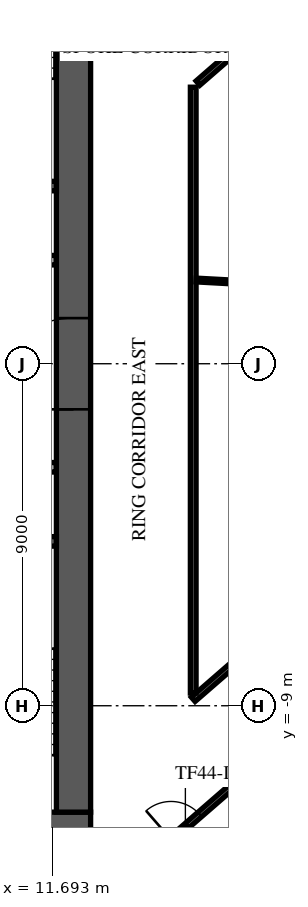
"""IFC4 building model, lengths in metres.
Left out: names, types, materials, properties, quantities, classifications, styles, units other than length and angle.
Written with IfcOpenShell. Run it as: python <this file> out.ifc"""

import sys

from ifc_helpers import new_model, si_unit, direction, frame, frame_2d, origin, place, context, subcontext, project, spatial, rectangle, extrude, element, fill, save


model = new_model("IFC4")
c1 = context("Model", 3, precision=1e-05, world=origin(), true_north=direction((0.0, 1.0)))
c2 = subcontext(c1, "Body", "Model", "MODEL_VIEW")
j1 = project(units=[si_unit("LENGTHUNIT", "METRE"), si_unit("PLANEANGLEUNIT", "RADIAN")], contexts=[c1])
p1 = place(None, origin())
s1 = spatial("IfcSite", under=j1, at=p1, CompositionType="ELEMENT")
p2 = place(p1, origin())
s2 = spatial("IfcBuilding", under=s1, at=p2, CompositionType="ELEMENT")
p3 = place(p2, frame((0.0, 0.0, 189.3)))
s3 = spatial("IfcBuildingStorey", under=s2, at=p3, CompositionType="ELEMENT", Elevation=189.3)
p4 = place(p3, frame((-12.7, -12.25, 0.0), z_axis=(0.0, 0.0, 1.0), x_axis=(1.0, 0.0, 0.0)))
e1 = element("IfcWall", 1, at=p4, inside=s3, PredefinedType="SHEAR", context=c2, shape_type="SweptSolid", body=[
    extrude(rectangle(XDim=25.4, YDim=0.9, at=frame_2d((12.7, 0.0))), origin(), (0.0, 0.0, 1.0), 3.62),
])
p5 = place(p4, frame((7.6, 0.0, 0.0)))
e2 = element("IfcOpeningElement", 2, at=p5, cuts=e1, PredefinedType="OPENING", context=c2, shape_type="SweptSolid", body=[
    extrude(rectangle(XDim=2.0, YDim=2.1, at=frame_2d((1.0, 1.05))), frame((0.0, 0.46, 0.0), z_axis=(0.0, -1.0, 0.0), x_axis=(1.0, 0.0, 0.0)), (0.0, 0.0, 1.0), 0.92),
])
p6 = place(p4, frame((17.725, 0.0, 0.0)))
e3 = element("IfcOpeningElement", 3, at=p6, cuts=e1, PredefinedType="OPENING", context=c2, shape_type="SweptSolid", body=[
    extrude(rectangle(XDim=1.2, YDim=2.1, at=frame_2d((0.6, 1.05))), frame((0.0, 0.46, 0.0), z_axis=(0.0, -1.0, 0.0), x_axis=(1.0, 0.0, 0.0)), (0.0, 0.0, 1.0), 0.92),
])
p7 = place(p4, frame((1.875, 0.0, 0.0)))
e4 = element("IfcOpeningElement", 4, at=p7, cuts=e1, PredefinedType="OPENING", context=c2, shape_type="SweptSolid", body=[
    extrude(rectangle(XDim=1.2, YDim=2.1, at=frame_2d((0.6, 1.05))), frame((0.0, 0.46, 0.0), z_axis=(0.0, -1.0, 0.0), x_axis=(1.0, 0.0, 0.0)), (0.0, 0.0, 1.0), 0.92),
])
p8 = place(p4, frame((22.325, 0.0, 0.0)))
e5 = element("IfcOpeningElement", 5, at=p8, cuts=e1, PredefinedType="OPENING", context=c2, shape_type="SweptSolid", body=[
    extrude(rectangle(XDim=1.2, YDim=2.1, at=frame_2d((0.6, 1.05))), frame((0.0, 0.46, 0.0), z_axis=(0.0, -1.0, 0.0), x_axis=(1.0, 0.0, 0.0)), (0.0, 0.0, 1.0), 0.92),
])
p9 = place(p3, frame((12.25, -11.8, 0.0), z_axis=(0.0, 0.0, 1.0), x_axis=(0.0, 1.0, 0.0)))
e6 = element("IfcWall", 6, at=p9, inside=s3, PredefinedType="SHEAR", context=c2, shape_type="SweptSolid", body=[
    extrude(rectangle(XDim=23.6, YDim=0.9, at=frame_2d((11.8, 0.0))), origin(), (0.0, 0.0, 1.0), 3.62),
])
p10 = place(p9, frame((10.6, 0.0, 0.0)))
e7 = element("IfcOpeningElement", 7, at=p10, cuts=e6, PredefinedType="OPENING", context=c2, shape_type="SweptSolid", body=[
    extrude(rectangle(XDim=2.4, YDim=2.4, at=frame_2d((1.2, 1.2))), frame((0.0, 0.46, 0.0), z_axis=(0.0, -1.0, 0.0), x_axis=(1.0, 0.0, 0.0)), (0.0, 0.0, 1.0), 0.92),
])
for number, where, z_axis, x_axis in (
    (8, (8.65, 4.675, 0.0), (0.0, 0.0, 1.0), (1.0, 0.0, 0.0)),
    (9, (8.65, -4.675, 0.0), (0.0, 0.0, 1.0), (1.0, 0.0, 0.0)),
):
    element("IfcWall", number, at=place(p3, frame(where, z_axis=z_axis, x_axis=x_axis)), inside=s3, PredefinedType="SOLIDWALL", context=c2, shape_type="SweptSolid", body=[
        extrude(rectangle(XDim=3.15, YDim=0.25, at=frame_2d((1.575, 0.0))), origin(), (0.0, 0.0, 1.0), 3.62),
    ])
p11 = place(p3, frame((5.63, -2.725, 0.0), z_axis=(0.0, 0.0, 1.0), x_axis=(1.0, 0.0, 0.0)))
e10 = element("IfcWall", 10, at=p11, inside=s3, PredefinedType="PARTITIONING", context=c2, shape_type="SweptSolid", body=[
    extrude(rectangle(XDim=6.165, YDim=0.25, at=frame_2d((3.083, 0.0))), origin(), (0.0, 0.0, 1.0), 3.62),
])
p12 = place(p11, frame((0.745, 0.0, 0.0)))
e11 = element("IfcOpeningElement", 11, at=p12, cuts=e10, PredefinedType="OPENING", context=c2, shape_type="SweptSolid", body=[
    extrude(rectangle(XDim=1.0, YDim=2.1, at=frame_2d((0.5, 1.05))), frame((0.0, 0.135, 0.0), z_axis=(0.0, -1.0, 0.0), x_axis=(1.0, 0.0, 0.0)), (0.0, 0.0, 1.0), 0.27),
])
p13 = place(p11, frame((3.92, 0.0, 0.0)))
e12 = element("IfcOpeningElement", 12, at=p13, cuts=e10, PredefinedType="OPENING", context=c2, shape_type="SweptSolid", body=[
    extrude(rectangle(XDim=0.9, YDim=2.1, at=frame_2d((0.45, 1.05))), frame((0.0, 0.135, 0.0), z_axis=(0.0, -1.0, 0.0), x_axis=(1.0, 0.0, 0.0)), (0.0, 0.0, 1.0), 0.27),
])
p14 = place(p3, frame((8.38, 2.725, 0.0), z_axis=(0.0, 0.0, 1.0), x_axis=(1.0, 0.0, 0.0)))
e13 = element("IfcWall", 13, at=p14, inside=s3, PredefinedType="PARTITIONING", context=c2, shape_type="SweptSolid", body=[
    extrude(rectangle(XDim=3.415, YDim=0.25, at=frame_2d((1.708, 0.0))), origin(), (0.0, 0.0, 1.0), 3.62),
])
p15 = place(p14, frame((1.17, 0.0, 0.0)))
e14 = element("IfcOpeningElement", 14, at=p15, cuts=e13, PredefinedType="OPENING", context=c2, shape_type="SweptSolid", body=[
    extrude(rectangle(XDim=0.9, YDim=2.1, at=frame_2d((0.45, 1.05))), frame((0.0, 0.135, 0.0), z_axis=(0.0, -1.0, 0.0), x_axis=(1.0, 0.0, 0.0)), (0.0, 0.0, 1.0), 0.27),
])
p16 = place(p3, frame((-2.286, -34.715, 0.0), z_axis=(0.0, 0.0, 1.0), x_axis=(0.754708272811, 0.656060532993, 0.0)))
e15 = element("IfcWall", 15, at=p16, inside=s3, PredefinedType="STANDARD", context=c2, shape_type="SweptSolid", body=[
    extrude(rectangle(XDim=49.0, YDim=0.6, at=frame_2d((24.5, 0.0))), origin(), (0.0, 0.0, 1.0), 3.62),
])
p17 = place(p16, frame((1.227, 0.0, 0.9)))
e16 = element("IfcOpeningElement", 16, at=p17, cuts=e15, PredefinedType="OPENING", context=c2, shape_type="SweptSolid", body=[
    extrude(rectangle(XDim=2.0, YDim=2.1, at=frame_2d((1.0, 1.05))), frame((0.0, 0.31, 0.0), z_axis=(0.0, -1.0, 0.0), x_axis=(1.0, 0.0, 0.0)), (0.0, 0.0, 1.0), 0.62),
])
p18 = place(p16, frame((5.682, 0.0, 0.9)))
e17 = element("IfcOpeningElement", 17, at=p18, cuts=e15, PredefinedType="OPENING", context=c2, shape_type="SweptSolid", body=[
    extrude(rectangle(XDim=2.0, YDim=2.1, at=frame_2d((1.0, 1.05))), frame((0.0, 0.31, 0.0), z_axis=(0.0, -1.0, 0.0), x_axis=(1.0, 0.0, 0.0)), (0.0, 0.0, 1.0), 0.62),
])
p19 = place(p16, frame((10.136, 0.0, 0.9)))
e18 = element("IfcOpeningElement", 18, at=p19, cuts=e15, PredefinedType="OPENING", context=c2, shape_type="SweptSolid", body=[
    extrude(rectangle(XDim=2.0, YDim=2.1, at=frame_2d((1.0, 1.05))), frame((0.0, 0.31, 0.0), z_axis=(0.0, -1.0, 0.0), x_axis=(1.0, 0.0, 0.0)), (0.0, 0.0, 1.0), 0.62),
])
p20 = place(p16, frame((14.591, 0.0, 0.9)))
e19 = element("IfcOpeningElement", 19, at=p20, cuts=e15, PredefinedType="OPENING", context=c2, shape_type="SweptSolid", body=[
    extrude(rectangle(XDim=2.0, YDim=2.1, at=frame_2d((1.0, 1.05))), frame((0.0, 0.31, 0.0), z_axis=(0.0, -1.0, 0.0), x_axis=(1.0, 0.0, 0.0)), (0.0, 0.0, 1.0), 0.62),
])
p21 = place(p16, frame((19.045, 0.0, 0.9)))
e20 = element("IfcOpeningElement", 20, at=p21, cuts=e15, PredefinedType="OPENING", context=c2, shape_type="SweptSolid", body=[
    extrude(rectangle(XDim=2.0, YDim=2.1, at=frame_2d((1.0, 1.05))), frame((0.0, 0.31, 0.0), z_axis=(0.0, -1.0, 0.0), x_axis=(1.0, 0.0, 0.0)), (0.0, 0.0, 1.0), 0.62),
])
p22 = place(p16, frame((23.5, 0.0, 0.9)))
e21 = element("IfcOpeningElement", 21, at=p22, cuts=e15, PredefinedType="OPENING", context=c2, shape_type="SweptSolid", body=[
    extrude(rectangle(XDim=2.0, YDim=2.1, at=frame_2d((1.0, 1.05))), frame((0.0, 0.31, 0.0), z_axis=(0.0, -1.0, 0.0), x_axis=(1.0, 0.0, 0.0)), (0.0, 0.0, 1.0), 0.62),
])
p23 = place(p16, frame((27.955, 0.0, 0.9)))
e22 = element("IfcOpeningElement", 22, at=p23, cuts=e15, PredefinedType="OPENING", context=c2, shape_type="SweptSolid", body=[
    extrude(rectangle(XDim=2.0, YDim=2.1, at=frame_2d((1.0, 1.05))), frame((0.0, 0.31, 0.0), z_axis=(0.0, -1.0, 0.0), x_axis=(1.0, 0.0, 0.0)), (0.0, 0.0, 1.0), 0.62),
])
p24 = place(p16, frame((32.409, 0.0, 0.9)))
e23 = element("IfcOpeningElement", 23, at=p24, cuts=e15, PredefinedType="OPENING", context=c2, shape_type="SweptSolid", body=[
    extrude(rectangle(XDim=2.0, YDim=2.1, at=frame_2d((1.0, 1.05))), frame((0.0, 0.31, 0.0), z_axis=(0.0, -1.0, 0.0), x_axis=(1.0, 0.0, 0.0)), (0.0, 0.0, 1.0), 0.62),
])
p25 = place(p16, frame((36.864, 0.0, 0.9)))
e24 = element("IfcOpeningElement", 24, at=p25, cuts=e15, PredefinedType="OPENING", context=c2, shape_type="SweptSolid", body=[
    extrude(rectangle(XDim=2.0, YDim=2.1, at=frame_2d((1.0, 1.05))), frame((0.0, 0.31, 0.0), z_axis=(0.0, -1.0, 0.0), x_axis=(1.0, 0.0, 0.0)), (0.0, 0.0, 1.0), 0.62),
])
p26 = place(p16, frame((41.318, 0.0, 0.9)))
e25 = element("IfcOpeningElement", 25, at=p26, cuts=e15, PredefinedType="OPENING", context=c2, shape_type="SweptSolid", body=[
    extrude(rectangle(XDim=2.0, YDim=2.1, at=frame_2d((1.0, 1.05))), frame((0.0, 0.31, 0.0), z_axis=(0.0, -1.0, 0.0), x_axis=(1.0, 0.0, 0.0)), (0.0, 0.0, 1.0), 0.62),
])
p27 = place(p16, frame((45.773, 0.0, 0.9)))
e26 = element("IfcOpeningElement", 26, at=p27, cuts=e15, PredefinedType="OPENING", context=c2, shape_type="SweptSolid", body=[
    extrude(rectangle(XDim=2.0, YDim=2.1, at=frame_2d((1.0, 1.05))), frame((0.0, 0.31, 0.0), z_axis=(0.0, -1.0, 0.0), x_axis=(1.0, 0.0, 0.0)), (0.0, 0.0, 1.0), 0.62),
])
p28 = place(p3, frame((35.208, 4.768, 0.0), z_axis=(0.0, 0.0, 1.0), x_axis=(-0.656058749455, 0.754709823219, 0.0)))
e27 = element("IfcWall", 27, at=p28, inside=s3, PredefinedType="STANDARD", context=c2, shape_type="SweptSolid", body=[
    extrude(rectangle(XDim=39.0, YDim=0.6, at=frame_2d((19.5, 0.0))), origin(), (0.0, 0.0, 1.0), 3.62),
])
p29 = place(p28, frame((1.217, 0.0, 0.9)))
e28 = element("IfcOpeningElement", 28, at=p29, cuts=e27, PredefinedType="OPENING", context=c2, shape_type="SweptSolid", body=[
    extrude(rectangle(XDim=1.9, YDim=2.1, at=frame_2d((0.95, 1.05))), frame((0.0, 0.31, 0.0), z_axis=(0.0, -1.0, 0.0), x_axis=(1.0, 0.0, 0.0)), (0.0, 0.0, 1.0), 0.62),
])
p30 = place(p28, frame((5.55, 0.0, 0.9)))
e29 = element("IfcOpeningElement", 29, at=p30, cuts=e27, PredefinedType="OPENING", context=c2, shape_type="SweptSolid", body=[
    extrude(rectangle(XDim=1.9, YDim=2.1, at=frame_2d((0.95, 1.05))), frame((0.0, 0.31, 0.0), z_axis=(0.0, -1.0, 0.0), x_axis=(1.0, 0.0, 0.0)), (0.0, 0.0, 1.0), 0.62),
])
p31 = place(p28, frame((9.883, 0.0, 0.9)))
e30 = element("IfcOpeningElement", 30, at=p31, cuts=e27, PredefinedType="OPENING", context=c2, shape_type="SweptSolid", body=[
    extrude(rectangle(XDim=1.9, YDim=2.1, at=frame_2d((0.95, 1.05))), frame((0.0, 0.31, 0.0), z_axis=(0.0, -1.0, 0.0), x_axis=(1.0, 0.0, 0.0)), (0.0, 0.0, 1.0), 0.62),
])
p32 = place(p28, frame((14.217, 0.0, 0.9)))
e31 = element("IfcOpeningElement", 31, at=p32, cuts=e27, PredefinedType="OPENING", context=c2, shape_type="SweptSolid", body=[
    extrude(rectangle(XDim=1.9, YDim=2.1, at=frame_2d((0.95, 1.05))), frame((0.0, 0.31, 0.0), z_axis=(0.0, -1.0, 0.0), x_axis=(1.0, 0.0, 0.0)), (0.0, 0.0, 1.0), 0.62),
])
p33 = place(p28, frame((18.55, 0.0, 0.9)))
e32 = element("IfcOpeningElement", 32, at=p33, cuts=e27, PredefinedType="OPENING", context=c2, shape_type="SweptSolid", body=[
    extrude(rectangle(XDim=1.9, YDim=2.1, at=frame_2d((0.95, 1.05))), frame((0.0, 0.31, 0.0), z_axis=(0.0, -1.0, 0.0), x_axis=(1.0, 0.0, 0.0)), (0.0, 0.0, 1.0), 0.62),
])
p34 = place(p28, frame((22.883, 0.0, 0.9)))
e33 = element("IfcOpeningElement", 33, at=p34, cuts=e27, PredefinedType="OPENING", context=c2, shape_type="SweptSolid", body=[
    extrude(rectangle(XDim=1.9, YDim=2.1, at=frame_2d((0.95, 1.05))), frame((0.0, 0.31, 0.0), z_axis=(0.0, -1.0, 0.0), x_axis=(1.0, 0.0, 0.0)), (0.0, 0.0, 1.0), 0.62),
])
p35 = place(p28, frame((27.217, 0.0, 0.9)))
e34 = element("IfcOpeningElement", 34, at=p35, cuts=e27, PredefinedType="OPENING", context=c2, shape_type="SweptSolid", body=[
    extrude(rectangle(XDim=1.9, YDim=2.1, at=frame_2d((0.95, 1.05))), frame((0.0, 0.31, 0.0), z_axis=(0.0, -1.0, 0.0), x_axis=(1.0, 0.0, 0.0)), (0.0, 0.0, 1.0), 0.62),
])
p36 = place(p28, frame((31.55, 0.0, 0.9)))
e35 = element("IfcOpeningElement", 35, at=p36, cuts=e27, PredefinedType="OPENING", context=c2, shape_type="SweptSolid", body=[
    extrude(rectangle(XDim=1.9, YDim=2.1, at=frame_2d((0.95, 1.05))), frame((0.0, 0.31, 0.0), z_axis=(0.0, -1.0, 0.0), x_axis=(1.0, 0.0, 0.0)), (0.0, 0.0, 1.0), 0.62),
])
p37 = place(p28, frame((35.883, 0.0, 0.9)))
e36 = element("IfcOpeningElement", 36, at=p37, cuts=e27, PredefinedType="OPENING", context=c2, shape_type="SweptSolid", body=[
    extrude(rectangle(XDim=1.9, YDim=2.1, at=frame_2d((0.95, 1.05))), frame((0.0, 0.31, 0.0), z_axis=(0.0, -1.0, 0.0), x_axis=(1.0, 0.0, 0.0)), (0.0, 0.0, 1.0), 0.62),
])
p38 = place(p3, frame((-1.0, -26.268, 0.0), z_axis=(0.0, 0.0, 1.0), x_axis=(0.754711356604, 0.656056985492, 0.0)))
e37 = element("IfcWall", 37, at=p38, inside=s3, PredefinedType="PARTITIONING", context=c2, shape_type="SweptSolid", body=[
    extrude(rectangle(XDim=36.052, YDim=0.15, at=frame_2d((18.026, 0.0))), origin(), (0.0, 0.0, 1.0), 3.17),
])
p39 = place(p38, frame((9.598, 0.0, 0.0)))
e38 = element("IfcOpeningElement", 38, at=p39, cuts=e37, PredefinedType="OPENING", context=c2, shape_type="SweptSolid", body=[
    extrude(rectangle(XDim=1.0, YDim=2.1, at=frame_2d((0.5, 1.05))), frame((0.0, 0.085, 0.0), z_axis=(0.0, -1.0, 0.0), x_axis=(1.0, 0.0, 0.0)), (0.0, 0.0, 1.0), 0.17),
])
p40 = place(p38, frame((20.957, 0.0, 0.0)))
e39 = element("IfcOpeningElement", 39, at=p40, cuts=e37, PredefinedType="OPENING", context=c2, shape_type="SweptSolid", body=[
    extrude(rectangle(XDim=1.0, YDim=2.1, at=frame_2d((0.5, 1.05))), frame((0.0, 0.085, 0.0), z_axis=(0.0, -1.0, 0.0), x_axis=(1.0, 0.0, 0.0)), (0.0, 0.0, 1.0), 0.17),
])
p41 = place(p38, frame((27.87, 0.0, 0.0)))
e40 = element("IfcOpeningElement", 40, at=p41, cuts=e37, PredefinedType="OPENING", context=c2, shape_type="SweptSolid", body=[
    extrude(rectangle(XDim=1.8, YDim=2.1, at=frame_2d((0.9, 1.05))), frame((0.0, 0.085, 0.0), z_axis=(0.0, -1.0, 0.0), x_axis=(1.0, 0.0, 0.0)), (0.0, 0.0, 1.0), 0.17),
])
p42 = place(p3, frame((8.103, 24.087, 0.0), z_axis=(0.0, 0.0, 1.0), x_axis=(0.656048444225, -0.754718781289, 0.0)))
e41 = element("IfcWall", 41, at=p42, inside=s3, PredefinedType="PARTITIONING", context=c2, shape_type="SweptSolid", body=[
    extrude(rectangle(XDim=25.8, YDim=0.15, at=frame_2d((12.9, 0.0))), origin(), (0.0, 0.0, 1.0), 3.17),
])
p43 = place(p3, frame((15.4, -8.831, 0.0), z_axis=(0.0, 0.0, 1.0), x_axis=(0.754715065445, 0.656052718911, 0.0)))
e42 = element("IfcWall", 42, at=p43, inside=s3, PredefinedType="PARTITIONING", context=c2, shape_type="SweptSolid", body=[
    extrude(rectangle(XDim=12.234, YDim=0.15, at=frame_2d((6.117, 0.0))), origin(), (0.0, 0.0, 1.0), 3.17),
])
p44 = place(p43, frame((8.8, 0.0, 0.0)))
e43 = element("IfcOpeningElement", 43, at=p44, cuts=e42, PredefinedType="OPENING", context=c2, shape_type="SweptSolid", body=[
    extrude(rectangle(XDim=1.0, YDim=2.1, at=frame_2d((0.5, 1.05))), frame((0.0, 0.085, 0.0), z_axis=(0.0, -1.0, 0.0), x_axis=(1.0, 0.0, 0.0)), (0.0, 0.0, 1.0), 0.17),
])
p45 = place(p3, frame((15.4, -8.667, 0.0), z_axis=(0.0, 0.0, 1.0), x_axis=(0.0, 1.0, 0.0)))
e44 = element("IfcWall", 44, at=p45, inside=s3, PredefinedType="PARTITIONING", context=c2, shape_type="SweptSolid", body=[
    extrude(rectangle(XDim=15.944, YDim=0.15, at=frame_2d((7.972, 0.0))), origin(), (0.0, 0.0, 1.0), 3.17),
])
p46 = place(p3, frame((15.524, 7.385, 0.0), z_axis=(0.0, 0.0, 1.0), x_axis=(0.754751247574, 0.656011093111, 0.0)))
e45 = element("IfcWall", 45, at=p46, inside=s3, PredefinedType="PARTITIONING", context=c2, shape_type="SweptSolid", body=[
    extrude(rectangle(XDim=2.957, YDim=0.15, at=frame_2d((1.479, 0.0))), origin(), (0.0, 0.0, 1.0), 3.17),
])
p47 = place(p3, frame((15.478, 2.203, 0.0), z_axis=(0.0, 0.0, 1.0), x_axis=(0.998532575908, -0.054154361321, 0.0)))
e46 = element("IfcWall", 46, at=p47, inside=s3, PredefinedType="PARTITIONING", context=c2, shape_type="SweptSolid", body=[
    extrude(rectangle(XDim=15.869, YDim=0.1, at=frame_2d((7.935, 0.0))), origin(), (0.0, 0.0, 1.0), 3.62),
])
p48 = place(p10, origin())
e47 = element("IfcDoor", 47, at=p48, inside=s3, OperationType="SINGLE_SWING_LEFT", PredefinedType="DOOR", context=c2, shape_type="SweptSolid", body=[
    extrude(rectangle(XDim=2.4, YDim=2.4, at=frame_2d((1.2, 1.2))), frame((0.0, 0.025, 0.0), z_axis=(0.0, -1.0, 0.0), x_axis=(1.0, 0.0, 0.0)), (0.0, 0.0, 1.0), 0.05),
])
fill(e7, e47)
p49 = place(p40, frame((1.0, 0.0, 0.0), z_axis=(0.0, 0.0, 1.0), x_axis=(-1.0, 0.0, 0.0)))
e48 = element("IfcDoor", 48, at=p49, inside=s3, OperationType="SINGLE_SWING_LEFT", PredefinedType="DOOR", context=c2, shape_type="SweptSolid", body=[
    extrude(rectangle(XDim=1.0, YDim=2.1, at=frame_2d((0.5, 1.05))), frame((0.0, 0.025, 0.0), z_axis=(0.0, -1.0, 0.0), x_axis=(1.0, 0.0, 0.0)), (0.0, 0.0, 1.0), 0.05),
])
fill(e39, e48)
save(model, sys.argv[1])
